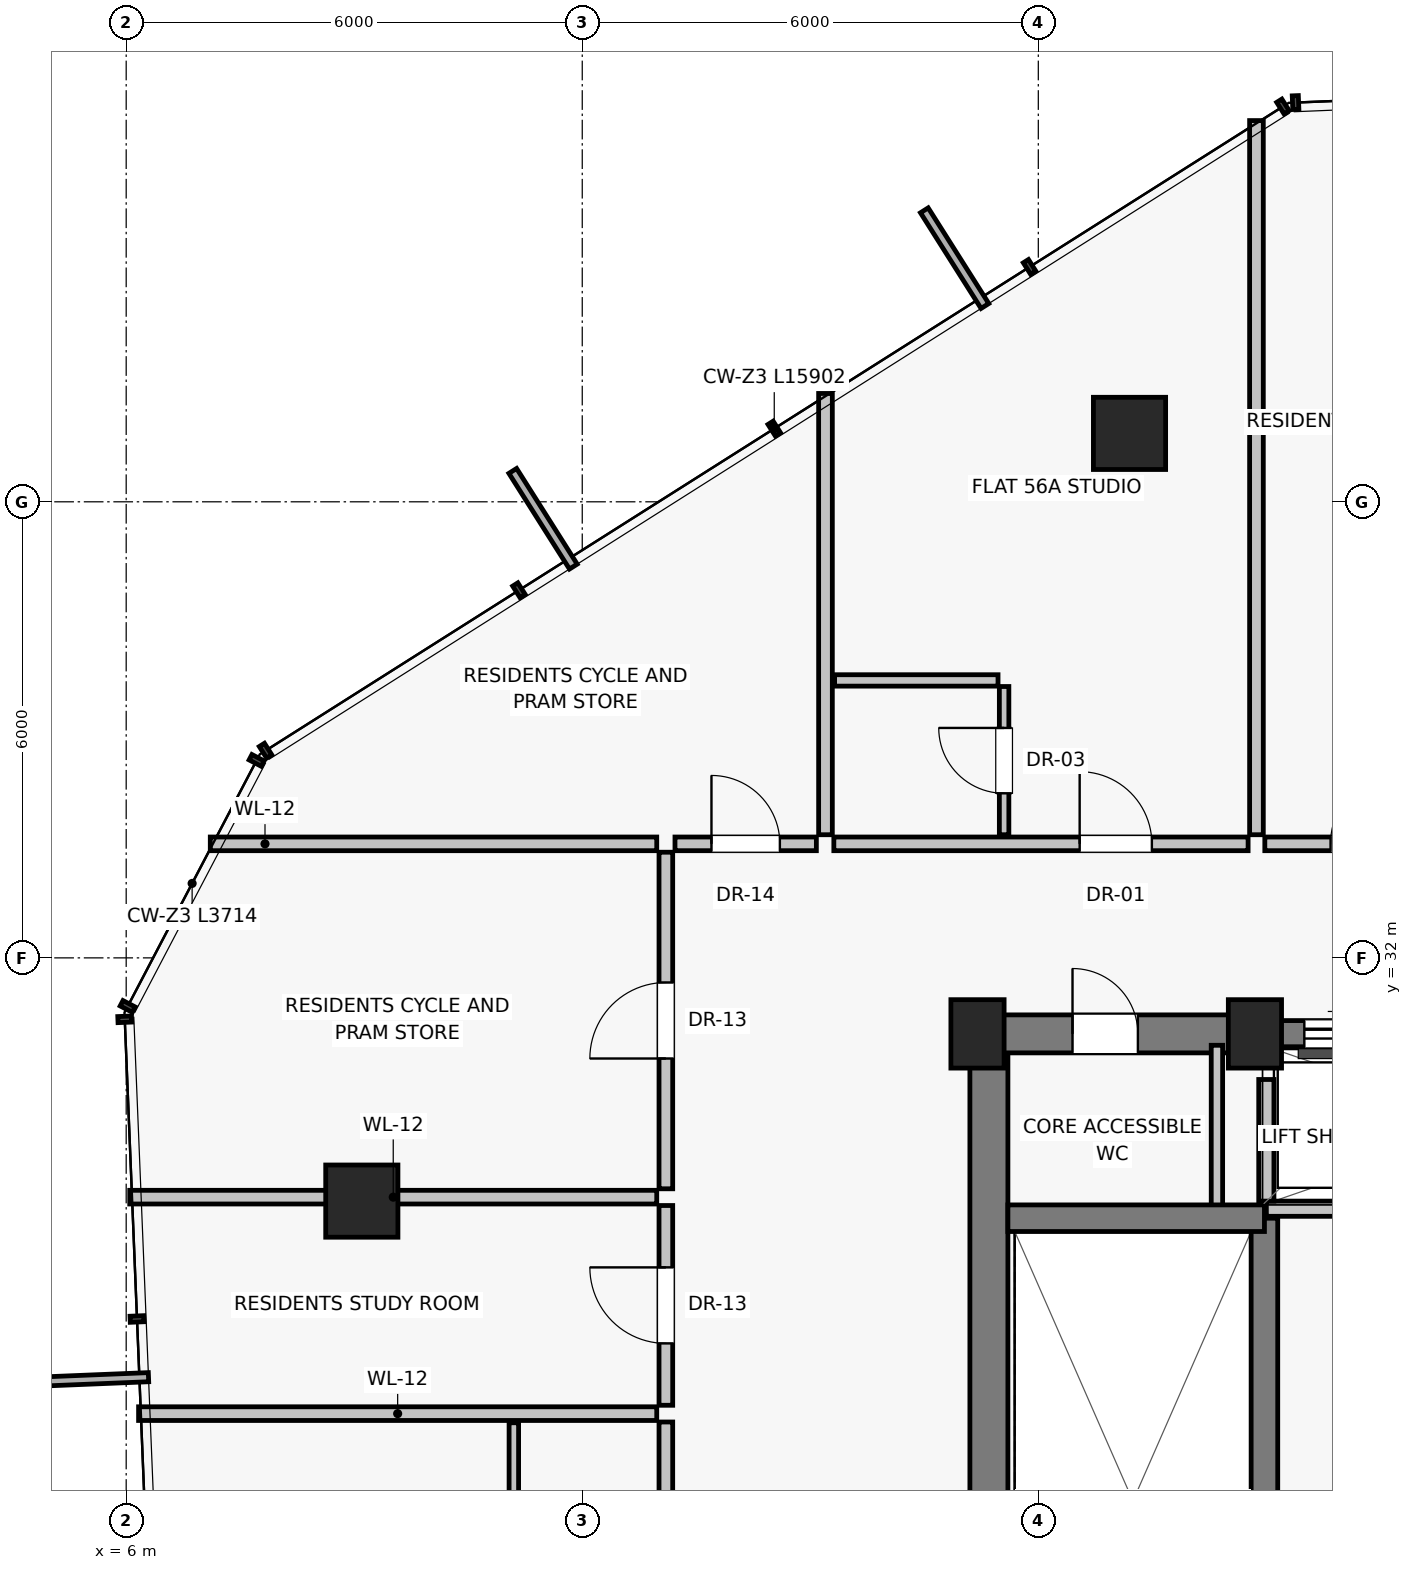
"""IFC4 building model, lengths in metres.
Left out: names, types, materials, properties, quantities, classifications, styles, units other than length and angle.
Written with IfcOpenShell. Run it as: python <this file> out.ifc"""

import sys

from ifc_helpers import new_model, si_unit, direction, frame, frame_2d, origin, origin_2d, place, context, subcontext, project, spatial, rectangle, extrude, source, transform, mapped, element, fill, save


model = new_model("IFC4")
c1 = context("Model", 3, precision=1e-05, world=origin(), true_north=direction((0.0, 1.0)))
c2 = subcontext(c1, "Body", "Model", "MODEL_VIEW")
j1 = project(units=[si_unit("LENGTHUNIT", "METRE"), si_unit("PLANEANGLEUNIT", "RADIAN")], contexts=[c1])
p1 = place(None, origin())
s1 = spatial("IfcSite", under=j1, at=p1, CompositionType="ELEMENT")
p2 = place(p1, origin())
s2 = spatial("IfcBuilding", under=s1, at=p2, CompositionType="ELEMENT")
p3 = place(p2, frame((0.0, 0.0, 198.35)))
s3 = spatial("IfcBuildingStorey", under=s2, at=p3, CompositionType="ELEMENT", Elevation=198.35)
for number, where, z_axis, x_axis in (
    (1, (17.2, 31.0, 0.0), (0.0, 0.0, 1.0), (1.0, 0.0, 0.0)),
    (2, (20.85, 31.0, 0.0), (0.0, 0.0, 1.0), (1.0, 0.0, 0.0)),
):
    element("IfcColumn", number, at=place(p3, frame(where, z_axis=z_axis, x_axis=x_axis)), inside=s3, PredefinedType="PILASTER", context=c2, shape_type="SweptSolid", body=[
        extrude(rectangle(XDim=0.7, YDim=0.9, at=origin_2d()), origin(), (0.0, 0.0, 1.0), 3.25),
    ])
for number, where, z_axis, x_axis in (
    (3, (19.2, 38.9, 0.0), (0.0, 0.0, 1.0), (1.0, 0.0, 0.0)),
    (4, (9.1, 28.8, 0.0), (0.0, 0.0, 1.0), (1.0, 0.0, 0.0)),
):
    element("IfcColumn", number, at=place(p3, frame(where, z_axis=z_axis, x_axis=x_axis)), inside=s3, PredefinedType="COLUMN", context=c2, shape_type="SweptSolid", body=[
        extrude(rectangle(XDim=0.95, YDim=0.95, at=origin_2d()), origin(), (0.0, 0.0, 1.0), 3.25),
    ])
p4 = place(p3, frame((17.35, 16.8, 0.0), z_axis=(0.0, 0.0, 1.0), x_axis=(0.0, 1.0, 0.0)))
e5 = element("IfcWall", 5, at=p4, inside=s3, PredefinedType="SHEAR", context=c2, shape_type="SweptSolid", body=[
    extrude(rectangle(XDim=14.2, YDim=0.5, at=frame_2d((7.1, 0.0))), origin(), (0.0, 0.0, 1.0), 3.015),
])
p5 = place(p3, frame((17.2, 31.0, 0.0), z_axis=(0.0, 0.0, 1.0), x_axis=(1.0, 0.0, 0.0)))
e6 = element("IfcWall", 6, at=p5, inside=s3, PredefinedType="SHEAR", context=c2, shape_type="SweptSolid", body=[
    extrude(rectangle(XDim=3.8, YDim=0.5, at=frame_2d((1.9, 0.0))), origin(), (0.0, 0.0, 1.0), 3.015),
])
p6 = place(p5, frame((1.25, 0.0, 0.0)))
e7 = element("IfcOpeningElement", 7, at=p6, cuts=e6, PredefinedType="OPENING", context=c2, shape_type="SweptSolid", body=[
    extrude(rectangle(XDim=0.86, YDim=2.01, at=frame_2d((0.43, 1.005))), frame((0.0, 0.26, 0.0), z_axis=(0.0, -1.0, 0.0), x_axis=(1.0, 0.0, 0.0)), (0.0, 0.0, 1.0), 0.52),
])
p7 = place(p3, frame((21.0, 31.0, 0.0), z_axis=(0.0, 0.0, 1.0), x_axis=(1.0, 0.0, 0.0)))
e8 = element("IfcWall", 8, at=p7, inside=s3, PredefinedType="SHEAR", context=c2, shape_type="SweptSolid", body=[
    extrude(rectangle(XDim=6.0, YDim=0.35, at=frame_2d((3.0, 0.0))), origin(), (0.0, 0.0, 1.0), 3.015),
])
p8 = place(p7, frame((0.5, 0.0, 0.0)))
e9 = element("IfcOpeningElement", 9, at=p8, cuts=e8, PredefinedType="OPENING", context=c2, shape_type="SweptSolid", body=[
    extrude(rectangle(XDim=1.1, YDim=2.08, at=frame_2d((0.55, 1.04))), frame((0.0, 0.185, 0.0), z_axis=(0.0, -1.0, 0.0), x_axis=(1.0, 0.0, 0.0)), (0.0, 0.0, 1.0), 0.37),
])
p9 = place(p7, frame((2.45, 0.0, 0.0)))
e10 = element("IfcOpeningElement", 10, at=p9, cuts=e8, PredefinedType="OPENING", context=c2, shape_type="SweptSolid", body=[
    extrude(rectangle(XDim=1.1, YDim=2.08, at=frame_2d((0.55, 1.04))), frame((0.0, 0.185, 0.0), z_axis=(0.0, -1.0, 0.0), x_axis=(1.0, 0.0, 0.0)), (0.0, 0.0, 1.0), 0.37),
])
p10 = place(p7, frame((4.4, 0.0, 0.0)))
e11 = element("IfcOpeningElement", 11, at=p10, cuts=e8, PredefinedType="OPENING", context=c2, shape_type="SweptSolid", body=[
    extrude(rectangle(XDim=1.1, YDim=2.08, at=frame_2d((0.55, 1.04))), frame((0.0, 0.185, 0.0), z_axis=(0.0, -1.0, 0.0), x_axis=(1.0, 0.0, 0.0)), (0.0, 0.0, 1.0), 0.37),
])
p11 = place(p3, frame((20.35, 28.65, 0.0), z_axis=(0.0, 0.0, 1.0), x_axis=(0.0, 1.0, 0.0)))
e12 = element("IfcWall", 12, at=p11, inside=s3, PredefinedType="PARTITIONING", context=c2, shape_type="SweptSolid", body=[
    extrude(rectangle(XDim=2.2, YDim=0.15, at=frame_2d((1.1, 0.0))), origin(), (0.0, 0.0, 1.0), 3.015),
])
p12 = place(p3, frame((20.975, 19.8, 0.0), z_axis=(0.0, 0.0, 1.0), x_axis=(0.0, 1.0, 0.0)))
e13 = element("IfcWall", 13, at=p12, inside=s3, PredefinedType="SHEAR", context=c2, shape_type="SweptSolid", body=[
    extrude(rectangle(XDim=8.775, YDim=0.35, at=frame_2d((4.387, 0.0))), origin(), (0.0, 0.0, 1.0), 3.015),
])
p13 = place(p3, frame((17.6, 28.575, 0.0), z_axis=(0.0, 0.0, 1.0), x_axis=(1.0, 0.0, 0.0)))
e14 = element("IfcWall", 14, at=p13, inside=s3, PredefinedType="SHEAR", context=c2, shape_type="SweptSolid", body=[
    extrude(rectangle(XDim=3.375, YDim=0.35, at=frame_2d((1.688, 0.0))), origin(), (0.0, 0.0, 1.0), 3.015),
])
p14 = place(p3, frame((21.0, 28.7, 0.0), z_axis=(0.0, 0.0, 1.0), x_axis=(1.0, 0.0, 0.0)))
e15 = element("IfcWall", 15, at=p14, inside=s3, PredefinedType="SOLIDWALL", context=c2, shape_type="SweptSolid", body=[
    extrude(rectangle(XDim=6.0, YDim=0.2, at=frame_2d((3.0, 0.0))), origin(), (0.0, 0.0, 1.0), 3.015),
])
p15 = place(p3, frame((21.0, 28.8, 0.0), z_axis=(0.0, 0.0, 1.0), x_axis=(0.0, 1.0, 0.0)))
e16 = element("IfcWall", 16, at=p15, inside=s3, PredefinedType="SOLIDWALL", context=c2, shape_type="SweptSolid", body=[
    extrude(rectangle(XDim=1.6, YDim=0.2, at=frame_2d((0.8, 0.0))), origin(), (0.0, 0.0, 1.0), 3.015),
])
p16 = place(p3, frame((15.2, 33.62, 0.0), z_axis=(0.0, 0.0, 1.0), x_axis=(0.0, 1.0, 0.0)))
e17 = element("IfcWall", 17, at=p16, inside=s3, PredefinedType="PARTITIONING", context=c2, shape_type="SweptSolid", body=[
    extrude(rectangle(XDim=5.805, YDim=0.18, at=frame_2d((2.903, 0.0))), origin(), (0.0, 0.0, 1.0), 3.015),
])
p17 = place(p3, frame((20.98, 33.5, 0.0), z_axis=(0.0, 0.0, 1.0), x_axis=(1.0, 0.0, 0.0)))
e18 = element("IfcWall", 18, at=p17, inside=s3, PredefinedType="PARTITIONING", context=c2, shape_type="SweptSolid", body=[
    extrude(rectangle(XDim=2.73, YDim=0.18, at=frame_2d((1.365, 0.0))), origin(), (0.0, 0.0, 1.0), 3.015),
])
p18 = place(p17, frame((0.865, 0.0, 0.0)))
e19 = element("IfcOpeningElement", 19, at=p18, cuts=e18, PredefinedType="OPENING", context=c2, shape_type="SweptSolid", body=[
    extrude(rectangle(XDim=1.0, YDim=2.01, at=frame_2d((0.5, 1.005))), frame((0.0, 0.1, 0.0), z_axis=(0.0, -1.0, 0.0), x_axis=(1.0, 0.0, 0.0)), (0.0, 0.0, 1.0), 0.2),
])
p19 = place(p3, frame((20.87, 33.62, 0.0), z_axis=(0.0, 0.0, 1.0), x_axis=(0.0, 1.0, 0.0)))
e20 = element("IfcWall", 20, at=p19, inside=s3, PredefinedType="PARTITIONING", context=c2, shape_type="SweptSolid", body=[
    extrude(rectangle(XDim=9.395, YDim=0.18, at=frame_2d((4.698, 0.0))), origin(), (0.0, 0.0, 1.0), 3.015),
])
p20 = place(p3, frame((15.31, 33.5, 0.0), z_axis=(0.0, 0.0, 1.0), x_axis=(1.0, 0.0, 0.0)))
e21 = element("IfcWall", 21, at=p20, inside=s3, PredefinedType="PARTITIONING", context=c2, shape_type="SweptSolid", body=[
    extrude(rectangle(XDim=5.45, YDim=0.18, at=frame_2d((2.725, 0.0))), origin(), (0.0, 0.0, 1.0), 3.015),
])
p21 = place(p20, frame((3.234, 0.0, 0.0)))
e22 = element("IfcOpeningElement", 22, at=p21, cuts=e21, PredefinedType="OPENING", context=c2, shape_type="SweptSolid", body=[
    extrude(rectangle(XDim=0.95, YDim=2.02, at=frame_2d((0.475, 1.01))), frame((0.0, 0.1, 0.0), z_axis=(0.0, -1.0, 0.0), x_axis=(1.0, 0.0, 0.0)), (0.0, 0.0, 1.0), 0.2),
])
p22 = place(p3, frame((17.55, 33.62, 0.0), z_axis=(0.0, 0.0, 1.0), x_axis=(0.0, 1.0, 0.0)))
e23 = element("IfcWall", 23, at=p22, inside=s3, PredefinedType="PARTITIONING", context=c2, shape_type="SweptSolid", body=[
    extrude(rectangle(XDim=1.95, YDim=0.125, at=frame_2d((0.975, 0.0))), origin(), (0.0, 0.0, 1.0), 3.015),
])
p23 = place(p22, frame((0.545, 0.0, 0.0)))
e24 = element("IfcOpeningElement", 24, at=p23, cuts=e23, PredefinedType="OPENING", context=c2, shape_type="SweptSolid", body=[
    extrude(rectangle(XDim=0.86, YDim=2.01, at=frame_2d((0.43, 1.005))), frame((0.0, 0.073, 0.0), z_axis=(0.0, -1.0, 0.0), x_axis=(1.0, 0.0, 0.0)), (0.0, 0.0, 1.0), 0.145),
])
p24 = place(p3, frame((15.32, 35.65, 0.0), z_axis=(0.0, 0.0, 1.0), x_axis=(1.0, 0.0, 0.0)))
e25 = element("IfcWall", 25, at=p24, inside=s3, PredefinedType="PARTITIONING", context=c2, shape_type="SweptSolid", body=[
    extrude(rectangle(XDim=2.15, YDim=0.15, at=frame_2d((1.075, 0.0))), origin(), (0.0, 0.0, 1.0), 3.015),
])
p25 = place(p3, frame((12.98, 33.5, 0.0), z_axis=(0.0, 0.0, 1.0), x_axis=(-1.0, 0.0, 0.0)))
e26 = element("IfcWall", 26, at=p25, inside=s3, PredefinedType="PARTITIONING", context=c2, shape_type="SweptSolid", body=[
    extrude(rectangle(XDim=5.874, YDim=0.18, at=frame_2d((2.937, 0.0))), origin(), (0.0, 0.0, 1.0), 3.015),
])
p26 = place(p3, frame((13.1, 14.41, 0.0), z_axis=(0.0, 0.0, 1.0), x_axis=(0.0, 1.0, 0.0)))
e27 = element("IfcWall", 27, at=p26, inside=s3, PredefinedType="PARTITIONING", context=c2, shape_type="SweptSolid", body=[
    extrude(rectangle(XDim=11.484, YDim=0.18, at=frame_2d((5.742, 0.0))), origin(), (0.0, 0.0, 1.0), 2.662),
])
p27 = place(p26, frame((3.759, 0.0, 0.0)))
e28 = element("IfcOpeningElement", 28, at=p27, cuts=e27, PredefinedType="OPENING", context=c2, shape_type="SweptSolid", body=[
    extrude(rectangle(XDim=0.95, YDim=2.02, at=frame_2d((0.475, 1.01))), frame((0.0, 0.1, 0.0), z_axis=(0.0, -1.0, 0.0), x_axis=(1.0, 0.0, 0.0)), (0.0, 0.0, 1.0), 0.2),
])
p28 = place(p3, frame((11.1, 20.837, 0.0), z_axis=(0.0, 0.0, 1.0), x_axis=(0.0, 1.0, 0.0)))
e29 = element("IfcWall", 29, at=p28, inside=s3, PredefinedType="PARTITIONING", context=c2, shape_type="SweptSolid", body=[
    extrude(rectangle(XDim=5.047, YDim=0.125, at=frame_2d((2.523, 0.0))), origin(), (0.0, 0.0, 1.0), 3.015),
])
p29 = place(p3, frame((12.98, 26.004, 0.0), z_axis=(0.0, 0.0, 1.0), x_axis=(-1.0, 0.0, 0.0)))
e30 = element("IfcWall", 30, at=p29, inside=s3, PredefinedType="PARTITIONING", context=c2, shape_type="SweptSolid", body=[
    extrude(rectangle(XDim=6.817, YDim=0.18, at=frame_2d((3.408, 0.0))), origin(), (0.0, 0.0, 1.0), 3.015),
])
p30 = place(p3, frame((13.1, 26.114, 0.0), z_axis=(0.0, 0.0, 1.0), x_axis=(0.0, 1.0, 0.0)))
e31 = element("IfcWall", 31, at=p30, inside=s3, PredefinedType="PARTITIONING", context=c2, shape_type="SweptSolid", body=[
    extrude(rectangle(XDim=2.628, YDim=0.18, at=frame_2d((1.314, 0.0))), origin(), (0.0, 0.0, 1.0), 2.662),
])
p31 = place(p30, frame((0.814, 0.0, 0.0)))
e32 = element("IfcOpeningElement", 32, at=p31, cuts=e31, PredefinedType="OPENING", context=c2, shape_type="SweptSolid", body=[
    extrude(rectangle(XDim=1.0, YDim=2.01, at=frame_2d((0.5, 1.005))), frame((0.0, 0.1, 0.0), z_axis=(0.0, -1.0, 0.0), x_axis=(1.0, 0.0, 0.0)), (0.0, 0.0, 1.0), 0.2),
])
p32 = place(p3, frame((13.1, 28.962, 0.0), z_axis=(0.0, 0.0, 1.0), x_axis=(0.0, 1.0, 0.0)))
e33 = element("IfcWall", 33, at=p32, inside=s3, PredefinedType="PARTITIONING", context=c2, shape_type="SweptSolid", body=[
    extrude(rectangle(XDim=4.428, YDim=0.18, at=frame_2d((2.214, 0.0))), origin(), (0.0, 0.0, 1.0), 2.662),
])
p33 = place(p32, frame((1.714, 0.0, 0.0)))
e34 = element("IfcOpeningElement", 34, at=p33, cuts=e33, PredefinedType="OPENING", context=c2, shape_type="SweptSolid", body=[
    extrude(rectangle(XDim=1.0, YDim=2.01, at=frame_2d((0.5, 1.005))), frame((0.0, 0.1, 0.0), z_axis=(0.0, -1.0, 0.0), x_axis=(1.0, 0.0, 0.0)), (0.0, 0.0, 1.0), 0.2),
])
p34 = place(p3, frame((12.98, 28.852, 0.0), z_axis=(0.0, 0.0, 1.0), x_axis=(-1.0, 0.0, 0.0)))
e35 = element("IfcWall", 35, at=p34, inside=s3, PredefinedType="PARTITIONING", context=c2, shape_type="SweptSolid", body=[
    extrude(rectangle(XDim=6.933, YDim=0.18, at=frame_2d((3.467, 0.0))), origin(), (0.0, 0.0, 1.0), 2.469),
])
p35 = place(p3, frame((13.22, 33.5, 0.0), z_axis=(0.0, 0.0, 1.0), x_axis=(1.0, 0.0, 0.0)))
e36 = element("IfcWall", 36, at=p35, inside=s3, PredefinedType="PARTITIONING", context=c2, shape_type="SweptSolid", body=[
    extrude(rectangle(XDim=1.86, YDim=0.18, at=frame_2d((0.93, 0.0))), origin(), (0.0, 0.0, 1.0), 3.015),
])
p36 = place(p35, frame((0.48, 0.0, 0.0)))
e37 = element("IfcOpeningElement", 37, at=p36, cuts=e36, PredefinedType="OPENING", context=c2, shape_type="SweptSolid", body=[
    extrude(rectangle(XDim=0.9, YDim=2.01, at=frame_2d((0.45, 1.005))), frame((0.0, 0.1, 0.0), z_axis=(0.0, -1.0, 0.0), x_axis=(1.0, 0.0, 0.0)), (0.0, 0.0, 1.0), 0.2),
])
m1 = source(origin(), c2, "Body", "SweptSolid", [
    extrude(rectangle(XDim=0.86, YDim=2.01, at=frame_2d((0.43, 1.005))), frame((0.0, 0.025, 0.0), z_axis=(0.0, -1.0, 0.0), x_axis=(1.0, 0.0, 0.0)), (0.0, 0.0, 1.0), 0.05),
])
p37 = place(p6, origin())
e38 = element("IfcDoor", 38, at=p37, inside=s3, OperationType="SINGLE_SWING_LEFT", PredefinedType="DOOR", context=c2, shape_type="MappedRepresentation", body=[
    mapped(m1, transform((0.0, 0.0, 0.0), scale=1.0)),
])
fill(e7, e38)
m2 = source(origin(), c2, "Body", "SweptSolid", [
    extrude(rectangle(XDim=1.1, YDim=2.08, at=frame_2d((0.55, 1.04))), frame((0.0, 0.025, 0.0), z_axis=(0.0, -1.0, 0.0), x_axis=(1.0, 0.0, 0.0)), (0.0, 0.0, 1.0), 0.05),
])
p38 = place(p8, origin())
e39 = element("IfcDoor", 39, at=p38, inside=s3, OperationType="SLIDING_TO_LEFT", PredefinedType="DOOR", context=c2, shape_type="MappedRepresentation", body=[
    mapped(m2, transform((0.0, 0.0, 0.0), scale=1.0)),
])
fill(e9, e39)
m3 = source(origin(), c2, "Body", "SweptSolid", [
    extrude(rectangle(XDim=1.0, YDim=2.01, at=frame_2d((0.5, 1.005))), frame((0.0, 0.025, 0.0), z_axis=(0.0, -1.0, 0.0), x_axis=(1.0, 0.0, 0.0)), (0.0, 0.0, 1.0), 0.05),
])
p39 = place(p18, origin())
e40 = element("IfcDoor", 40, at=p39, inside=s3, OperationType="SINGLE_SWING_RIGHT", PredefinedType="DOOR", context=c2, shape_type="MappedRepresentation", body=[
    mapped(m3, transform((0.0, 0.0, 0.0), scale=1.0)),
])
fill(e19, e40)
m4 = source(origin(), c2, "Body", "SweptSolid", [
    extrude(rectangle(XDim=0.95, YDim=2.02, at=frame_2d((0.475, 1.01))), frame((0.0, 0.025, 0.0), z_axis=(0.0, -1.0, 0.0), x_axis=(1.0, 0.0, 0.0)), (0.0, 0.0, 1.0), 0.05),
])
p40 = place(p21, origin())
e41 = element("IfcDoor", 41, at=p40, inside=s3, OperationType="SINGLE_SWING_LEFT", PredefinedType="DOOR", context=c2, shape_type="MappedRepresentation", body=[
    mapped(m4, transform((0.0, 0.0, 0.0), scale=1.0)),
])
fill(e22, e41)
p41 = place(p23, origin())
e42 = element("IfcDoor", 42, at=p41, inside=s3, OperationType="SINGLE_SWING_RIGHT", PredefinedType="DOOR", context=c2, shape_type="MappedRepresentation", body=[
    mapped(m1, transform((0.0, 0.0, 0.0), scale=1.0)),
])
fill(e24, e42)
p42 = place(p31, origin())
e43 = element("IfcDoor", 43, at=p42, inside=s3, OperationType="SINGLE_SWING_RIGHT", PredefinedType="DOOR", context=c2, shape_type="MappedRepresentation", body=[
    mapped(m3, transform((0.0, 0.0, 0.0), scale=1.0)),
])
fill(e32, e43)
p43 = place(p33, origin())
e44 = element("IfcDoor", 44, at=p43, inside=s3, OperationType="SINGLE_SWING_LEFT", PredefinedType="DOOR", context=c2, shape_type="MappedRepresentation", body=[
    mapped(m3, transform((0.0, 0.0, 0.0), scale=1.0)),
])
fill(e34, e44)
m5 = source(origin(), c2, "Body", "SweptSolid", [
    extrude(rectangle(XDim=0.9, YDim=2.01, at=frame_2d((0.45, 1.005))), frame((0.0, 0.025, 0.0), z_axis=(0.0, -1.0, 0.0), x_axis=(1.0, 0.0, 0.0)), (0.0, 0.0, 1.0), 0.05),
])
p44 = place(p36, origin())
e45 = element("IfcDoor", 45, at=p44, inside=s3, OperationType="SINGLE_SWING_LEFT", PredefinedType="DOOR", context=c2, shape_type="MappedRepresentation", body=[
    mapped(m5, transform((0.0, 0.0, 0.0), scale=1.0)),
])
fill(e37, e45)
save(model, sys.argv[1])
